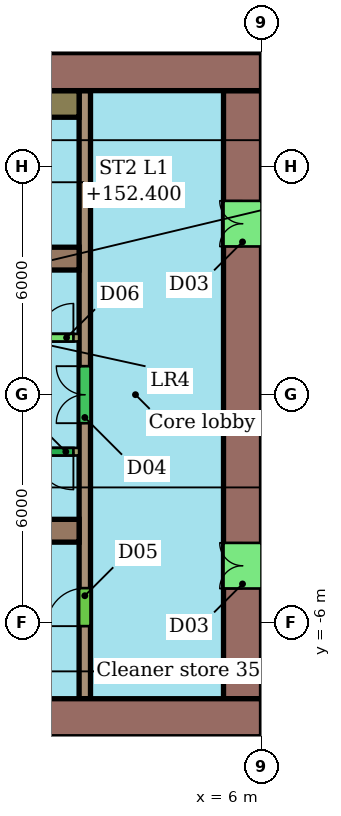
"""IFC4 building model, lengths in metres.
Left out: names, types, materials, properties, quantities, classifications, styles, units other than length and angle.
Written with IfcOpenShell. Run it as: python <this file> out.ifc"""

import sys

from ifc_helpers import new_model, si_unit, direction, frame, frame_2d, origin, place, context, subcontext, project, spatial, rectangle, extrude, element, fill, save


model = new_model("IFC4")
c1 = context("Model", 3, precision=1e-05, world=origin(), true_north=direction((0.0, 1.0)))
c2 = subcontext(c1, "Body", "Model", "MODEL_VIEW")
j1 = project(units=[si_unit("LENGTHUNIT", "METRE"), si_unit("PLANEANGLEUNIT", "RADIAN")], contexts=[c1])
p1 = place(None, origin())
s1 = spatial("IfcSite", under=j1, at=p1, CompositionType="ELEMENT")
p2 = place(p1, origin())
s2 = spatial("IfcBuilding", under=s1, at=p2, CompositionType="ELEMENT")
p3 = place(p2, frame((0.0, 0.0, 150.6)))
s3 = spatial("IfcBuildingStorey", under=s2, at=p3, CompositionType="ELEMENT", Elevation=150.6)
p4 = place(p3, frame((6.0, 8.5, 0.0), z_axis=(0.0, 0.0, 1.0), x_axis=(-1.0, 0.0, 0.0)))
e1 = element("IfcWall", 1, at=p4, inside=s3, PredefinedType="SHEAR", context=c2, shape_type="SweptSolid", body=[
    extrude(rectangle(XDim=12.0, YDim=1.0, at=frame_2d((6.0, 0.0))), origin(), (0.0, 0.0, 1.0), 3.3),
])
p5 = place(p4, frame((5.6, 0.0, 0.0)))
e2 = element("IfcOpeningElement", 2, at=p5, cuts=e1, PredefinedType="OPENING", context=c2, shape_type="SweptSolid", body=[
    extrude(rectangle(XDim=1.2, YDim=2.1, at=frame_2d((0.6, 1.05))), frame((0.0, 0.51, 0.0), z_axis=(0.0, -1.0, 0.0), x_axis=(1.0, 0.0, 0.0)), (0.0, 0.0, 1.0), 1.02),
])
p6 = place(p3, frame((-18.0, -8.5, 0.0), z_axis=(0.0, 0.0, 1.0), x_axis=(1.0, 0.0, 0.0)))
e3 = element("IfcWall", 3, at=p6, inside=s3, PredefinedType="SHEAR", context=c2, shape_type="SweptSolid", body=[
    extrude(rectangle(XDim=24.0, YDim=1.0, at=frame_2d((12.0, 0.0))), origin(), (0.0, 0.0, 1.0), 3.3),
])
p7 = place(p6, frame((6.0, 0.0, 0.0)))
e4 = element("IfcOpeningElement", 4, at=p7, cuts=e3, PredefinedType="OPENING", context=c2, shape_type="SweptSolid", body=[
    extrude(rectangle(XDim=1.2, YDim=2.1, at=frame_2d((0.6, 1.05))), frame((0.0, 0.51, 0.0), z_axis=(0.0, -1.0, 0.0), x_axis=(1.0, 0.0, 0.0)), (0.0, 0.0, 1.0), 1.02),
])
p8 = place(p3, frame((5.5, -8.0, 0.0), z_axis=(0.0, 0.0, 1.0), x_axis=(0.0, 1.0, 0.0)))
e5 = element("IfcWall", 5, at=p8, inside=s3, PredefinedType="SHEAR", context=c2, shape_type="SweptSolid", body=[
    extrude(rectangle(XDim=16.0, YDim=1.0, at=frame_2d((8.0, 0.0))), origin(), (0.0, 0.0, 1.0), 3.3),
])
p9 = place(p8, frame((2.9, 0.0, 0.0)))
e6 = element("IfcOpeningElement", 6, at=p9, cuts=e5, PredefinedType="OPENING", context=c2, shape_type="SweptSolid", body=[
    extrude(rectangle(XDim=1.2, YDim=2.1, at=frame_2d((0.6, 1.05))), frame((0.0, 0.51, 0.0), z_axis=(0.0, -1.0, 0.0), x_axis=(1.0, 0.0, 0.0)), (0.0, 0.0, 1.0), 1.02),
])
p10 = place(p8, frame((11.9, 0.0, 0.0)))
e7 = element("IfcOpeningElement", 7, at=p10, cuts=e5, PredefinedType="OPENING", context=c2, shape_type="SweptSolid", body=[
    extrude(rectangle(XDim=1.2, YDim=2.1, at=frame_2d((0.6, 1.05))), frame((0.0, 0.51, 0.0), z_axis=(0.0, -1.0, 0.0), x_axis=(1.0, 0.0, 0.0)), (0.0, 0.0, 1.0), 1.02),
])
for number, where, z_axis, x_axis in (
    (8, (-6.0, 3.58, 0.0), (0.0, 0.0, 1.0), (1.0, 0.0, 0.0)),
    (9, (-6.0, -3.58, 0.0), (0.0, 0.0, 1.0), (1.0, 0.0, 0.0)),
):
    element("IfcWall", number, at=place(p3, frame(where, z_axis=z_axis, x_axis=x_axis)), inside=s3, PredefinedType="SHEAR", context=c2, shape_type="SweptSolid", body=[
        extrude(rectangle(XDim=7.2, YDim=0.6, at=frame_2d((3.6, 0.0))), origin(), (0.0, 0.0, 1.0), 3.3),
    ])
p11 = place(p3, frame((1.35, -8.0, 0.0), z_axis=(0.0, 0.0, 1.0), x_axis=(0.0, 1.0, 0.0)))
e10 = element("IfcWall", 10, at=p11, inside=s3, PredefinedType="SHEAR", context=c2, shape_type="SweptSolid", body=[
    extrude(rectangle(XDim=16.0, YDim=0.3, at=frame_2d((8.0, 0.0))), origin(), (0.0, 0.0, 1.0), 3.3),
])
p12 = place(p11, frame((1.91, 0.0, 0.0)))
e11 = element("IfcOpeningElement", 11, at=p12, cuts=e10, PredefinedType="OPENING", context=c2, shape_type="SweptSolid", body=[
    extrude(rectangle(XDim=1.0, YDim=2.1, at=frame_2d((0.5, 1.05))), frame((0.0, 0.16, 0.0), z_axis=(0.0, -1.0, 0.0), x_axis=(1.0, 0.0, 0.0)), (0.0, 0.0, 1.0), 0.32),
])
p13 = place(p11, frame((7.25, 0.0, 0.0)))
e12 = element("IfcOpeningElement", 12, at=p13, cuts=e10, PredefinedType="OPENING", context=c2, shape_type="SweptSolid", body=[
    extrude(rectangle(XDim=1.5, YDim=2.1, at=frame_2d((0.75, 1.05))), frame((0.0, 0.16, 0.0), z_axis=(0.0, -1.0, 0.0), x_axis=(1.0, 0.0, 0.0)), (0.0, 0.0, 1.0), 0.32),
])
p14 = place(p3, frame((-13.2, 1.5, 0.0), z_axis=(0.0, 0.0, 1.0), x_axis=(1.0, 0.0, 0.0)))
e13 = element("IfcWall", 13, at=p14, inside=s3, PredefinedType="SHEAR", context=c2, shape_type="SweptSolid", body=[
    extrude(rectangle(XDim=14.4, YDim=0.2, at=frame_2d((7.2, 0.0))), origin(), (0.0, 0.0, 1.0), 3.3),
])
p15 = place(p14, frame((0.546, 0.0, 0.0)))
e14 = element("IfcOpeningElement", 14, at=p15, cuts=e13, PredefinedType="OPENING", context=c2, shape_type="SweptSolid", body=[
    extrude(rectangle(XDim=1.1, YDim=2.1, at=frame_2d((0.55, 1.05))), frame((0.0, 0.11, 0.0), z_axis=(0.0, -1.0, 0.0), x_axis=(1.0, 0.0, 0.0)), (0.0, 0.0, 1.0), 0.22),
])
p16 = place(p14, frame((2.988, 0.0, 0.0)))
e15 = element("IfcOpeningElement", 15, at=p16, cuts=e13, PredefinedType="OPENING", context=c2, shape_type="SweptSolid", body=[
    extrude(rectangle(XDim=1.1, YDim=2.1, at=frame_2d((0.55, 1.05))), frame((0.0, 0.11, 0.0), z_axis=(0.0, -1.0, 0.0), x_axis=(1.0, 0.0, 0.0)), (0.0, 0.0, 1.0), 0.22),
])
p17 = place(p14, frame((5.429, 0.0, 0.0)))
e16 = element("IfcOpeningElement", 16, at=p17, cuts=e13, PredefinedType="OPENING", context=c2, shape_type="SweptSolid", body=[
    extrude(rectangle(XDim=1.1, YDim=2.1, at=frame_2d((0.55, 1.05))), frame((0.0, 0.11, 0.0), z_axis=(0.0, -1.0, 0.0), x_axis=(1.0, 0.0, 0.0)), (0.0, 0.0, 1.0), 0.22),
])
p18 = place(p14, frame((7.871, 0.0, 0.0)))
e17 = element("IfcOpeningElement", 17, at=p18, cuts=e13, PredefinedType="OPENING", context=c2, shape_type="SweptSolid", body=[
    extrude(rectangle(XDim=1.1, YDim=2.1, at=frame_2d((0.55, 1.05))), frame((0.0, 0.11, 0.0), z_axis=(0.0, -1.0, 0.0), x_axis=(1.0, 0.0, 0.0)), (0.0, 0.0, 1.0), 0.22),
])
p19 = place(p14, frame((10.958, 0.0, 0.0)))
e18 = element("IfcOpeningElement", 18, at=p19, cuts=e13, PredefinedType="OPENING", context=c2, shape_type="SweptSolid", body=[
    extrude(rectangle(XDim=0.9, YDim=2.1, at=frame_2d((0.45, 1.05))), frame((0.0, 0.11, 0.0), z_axis=(0.0, -1.0, 0.0), x_axis=(1.0, 0.0, 0.0)), (0.0, 0.0, 1.0), 0.22),
])
p20 = place(p14, frame((13.35, 0.0, 0.0)))
e19 = element("IfcOpeningElement", 19, at=p20, cuts=e13, PredefinedType="OPENING", context=c2, shape_type="SweptSolid", body=[
    extrude(rectangle(XDim=0.9, YDim=2.1, at=frame_2d((0.45, 1.05))), frame((0.0, 0.11, 0.0), z_axis=(0.0, -1.0, 0.0), x_axis=(1.0, 0.0, 0.0)), (0.0, 0.0, 1.0), 0.22),
])
p21 = place(p3, frame((1.2, -1.5, 0.0), z_axis=(0.0, 0.0, 1.0), x_axis=(-1.0, 0.0, 0.0)))
e20 = element("IfcWall", 20, at=p21, inside=s3, PredefinedType="SHEAR", context=c2, shape_type="SweptSolid", body=[
    extrude(rectangle(XDim=14.4, YDim=0.2, at=frame_2d((7.2, 0.0))), origin(), (0.0, 0.0, 1.0), 3.3),
])
p22 = place(p21, frame((7.821, 0.0, 0.0)))
e21 = element("IfcOpeningElement", 21, at=p22, cuts=e20, PredefinedType="OPENING", context=c2, shape_type="SweptSolid", body=[
    extrude(rectangle(XDim=1.2, YDim=2.1, at=frame_2d((0.6, 1.05))), frame((0.0, 0.11, 0.0), z_axis=(0.0, -1.0, 0.0), x_axis=(1.0, 0.0, 0.0)), (0.0, 0.0, 1.0), 0.22),
])
p23 = place(p21, frame((0.15, 0.0, 0.0)))
e22 = element("IfcOpeningElement", 22, at=p23, cuts=e20, PredefinedType="OPENING", context=c2, shape_type="SweptSolid", body=[
    extrude(rectangle(XDim=1.0, YDim=2.1, at=frame_2d((0.5, 1.05))), frame((0.0, 0.11, 0.0), z_axis=(0.0, -1.0, 0.0), x_axis=(1.0, 0.0, 0.0)), (0.0, 0.0, 1.0), 0.22),
])
p24 = place(p3, frame((0.4, 7.65, 0.0), z_axis=(0.0, 0.0, 1.0), x_axis=(1.0, 0.0, 0.0)))
e23 = element("IfcWall", 23, at=p24, inside=s3, PredefinedType="SHEAR", context=c2, shape_type="SweptSolid", body=[
    extrude(rectangle(XDim=0.8, YDim=0.7, at=frame_2d((0.4, 0.0))), origin(), (0.0, 0.0, 1.0), 3.3),
])
p25 = place(p9, origin())
e24 = element("IfcDoor", 24, at=p25, inside=s3, OperationType="DOUBLE_DOOR_SINGLE_SWING", PredefinedType="NOTDEFINED", context=c2, shape_type="SweptSolid", body=[
    extrude(rectangle(XDim=1.2, YDim=2.1, at=frame_2d((0.6, 1.05))), frame((0.0, 0.025, 0.0), z_axis=(0.0, -1.0, 0.0), x_axis=(1.0, 0.0, 0.0)), (0.0, 0.0, 1.0), 0.05),
])
fill(e6, e24)
p26 = place(p10, origin())
e25 = element("IfcDoor", 25, at=p26, inside=s3, OperationType="DOUBLE_DOOR_SINGLE_SWING", PredefinedType="NOTDEFINED", context=c2, shape_type="SweptSolid", body=[
    extrude(rectangle(XDim=1.2, YDim=2.1, at=frame_2d((0.6, 1.05))), frame((0.0, 0.025, 0.0), z_axis=(0.0, -1.0, 0.0), x_axis=(1.0, 0.0, 0.0)), (0.0, 0.0, 1.0), 0.05),
])
fill(e7, e25)
p27 = place(p12, origin())
e26 = element("IfcDoor", 26, at=p27, inside=s3, OperationType="SINGLE_SWING_LEFT", PredefinedType="NOTDEFINED", context=c2, shape_type="SweptSolid", body=[
    extrude(rectangle(XDim=1.0, YDim=2.1, at=frame_2d((0.5, 1.05))), frame((0.0, 0.025, 0.0), z_axis=(0.0, -1.0, 0.0), x_axis=(1.0, 0.0, 0.0)), (0.0, 0.0, 1.0), 0.05),
])
fill(e11, e26)
p28 = place(p13, origin())
e27 = element("IfcDoor", 27, at=p28, inside=s3, OperationType="DOUBLE_DOOR_SINGLE_SWING", PredefinedType="NOTDEFINED", context=c2, shape_type="SweptSolid", body=[
    extrude(rectangle(XDim=1.5, YDim=2.1, at=frame_2d((0.75, 1.05))), frame((0.0, 0.025, 0.0), z_axis=(0.0, -1.0, 0.0), x_axis=(1.0, 0.0, 0.0)), (0.0, 0.0, 1.0), 0.05),
])
fill(e12, e27)
p29 = place(p20, origin())
e28 = element("IfcDoor", 28, at=p29, inside=s3, OperationType="SINGLE_SWING_RIGHT", PredefinedType="NOTDEFINED", context=c2, shape_type="SweptSolid", body=[
    extrude(rectangle(XDim=0.9, YDim=2.1, at=frame_2d((0.45, 1.05))), frame((0.0, 0.025, 0.0), z_axis=(0.0, -1.0, 0.0), x_axis=(1.0, 0.0, 0.0)), (0.0, 0.0, 1.0), 0.05),
])
fill(e19, e28)
p30 = place(p23, origin())
e29 = element("IfcDoor", 29, at=p30, inside=s3, OperationType="SINGLE_SWING_LEFT", PredefinedType="NOTDEFINED", context=c2, shape_type="SweptSolid", body=[
    extrude(rectangle(XDim=1.0, YDim=2.1, at=frame_2d((0.5, 1.05))), frame((0.0, 0.025, 0.0), z_axis=(0.0, -1.0, 0.0), x_axis=(1.0, 0.0, 0.0)), (0.0, 0.0, 1.0), 0.05),
])
fill(e22, e29)
save(model, sys.argv[1])
